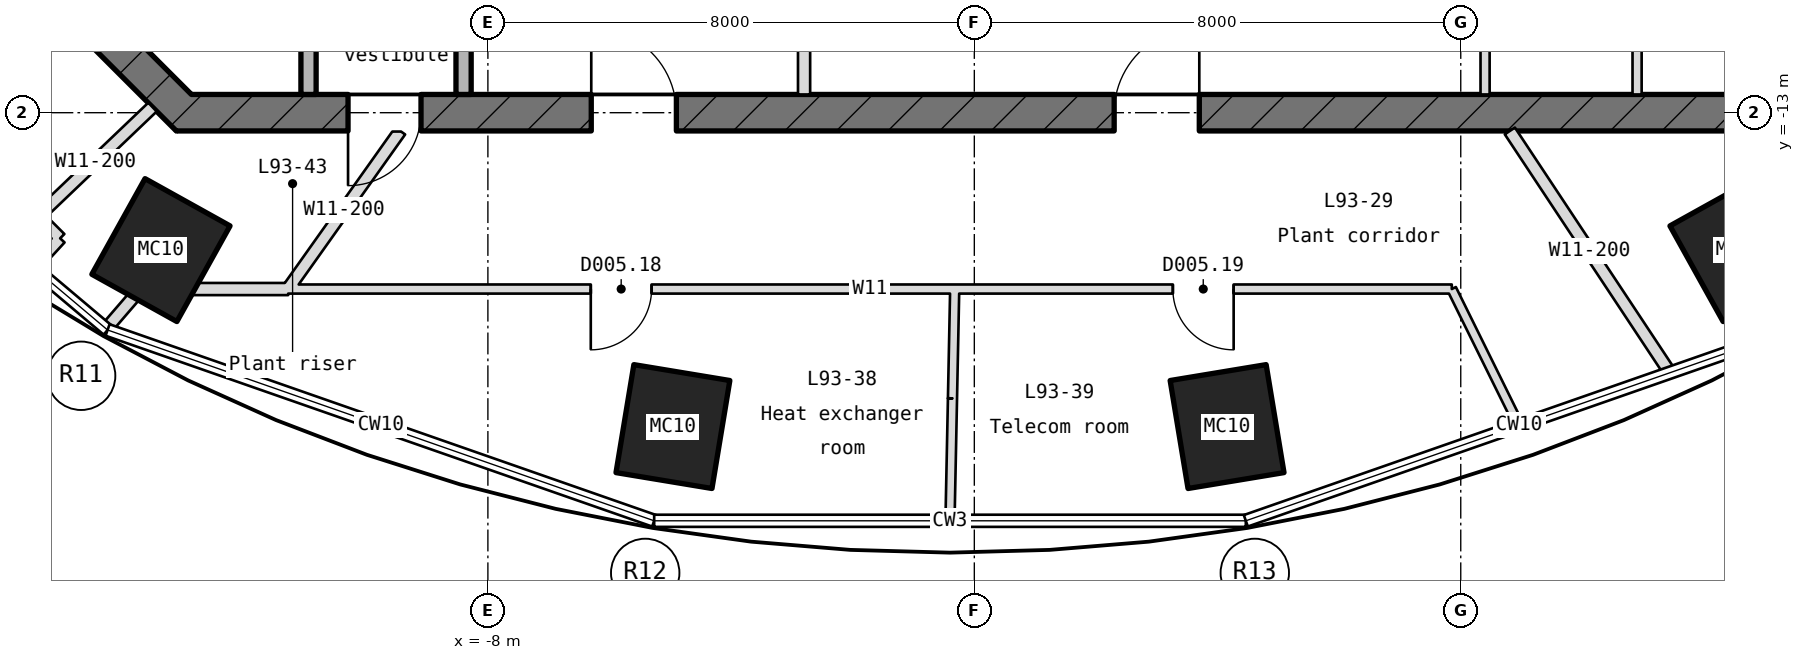
"""IFC4 building model, lengths in metres.
Left out: names, types, materials, properties, quantities, classifications, styles, units other than length and angle.
Written with IfcOpenShell. Run it as: python <this file> out.ifc"""

import sys

from ifc_helpers import new_model, si_unit, direction, frame, frame_2d, origin, origin_2d, place, context, subcontext, project, spatial, rectangle, hollow_rectangle, extrude, element, fill, save


model = new_model("IFC4")
c1 = context("Model", 3, precision=1e-05, world=origin(), true_north=direction((0.0, 1.0)))
c2 = subcontext(c1, "Body", "Model", "MODEL_VIEW")
j1 = project(units=[si_unit("LENGTHUNIT", "METRE"), si_unit("PLANEANGLEUNIT", "RADIAN")], contexts=[c1])
p1 = place(None, origin())
s1 = spatial("IfcSite", under=j1, at=p1, CompositionType="ELEMENT")
p2 = place(p1, origin())
s2 = spatial("IfcBuilding", under=s1, at=p2, CompositionType="ELEMENT")
p3 = place(p2, frame((0.0, 0.0, 413.55)))
s3 = spatial("IfcBuildingStorey", under=s2, at=p3, CompositionType="ELEMENT", Elevation=413.55)
for number, where, z_axis, x_axis in (
    (1, (-13.377, -15.26, -0.2), (0.0, 0.0, 1.0), (-0.874, 0.486, 0.0)),
    (2, (-4.957, -18.162, -0.2), (0.0, 0.0, 1.0), (-0.987, 0.163, 0.0)),
    (3, (4.157, -18.162, -0.2), (0.0, 0.0, 1.0), (-0.987, -0.163, 0.0)),
    (4, (12.577, -15.26, -0.2), (0.0, 0.0, 1.0), (-0.874, -0.486, 0.0)),
):
    element("IfcColumn", number, at=place(p3, frame(where, z_axis=z_axis, x_axis=x_axis)), inside=s3, PredefinedType="COLUMN", context=c2, shape_type="SweptSolid", body=[
        extrude(hollow_rectangle(XDim=1.6, YDim=1.8, WallThickness=0.045, at=origin_2d()), origin(), (0.0, 0.0, 1.0), 5.0),
    ])
p4 = place(p3, frame((-16.088, -9.912, -0.2), z_axis=(0.0, 0.0, 1.0), x_axis=(0.707106781187, -0.707106781187, 0.0)))
e5 = element("IfcWall", 5, at=p4, inside=s3, PredefinedType="SHEAR", context=c2, shape_type="SweptSolid", body=[
    extrude(rectangle(XDim=4.491, YDim=0.6, at=frame_2d((2.246, 0.0))), origin(), (0.0, 0.0, 1.0), 5.0),
])
p5 = place(p3, frame((-13.124, -13.0, -0.2), z_axis=(0.0, 0.0, 1.0), x_axis=(1.0, 0.0, 0.0)))
e6 = element("IfcWall", 6, at=p5, inside=s3, PredefinedType="SHEAR", context=c2, shape_type="SweptSolid", body=[
    extrude(rectangle(XDim=26.249, YDim=0.6, at=frame_2d((13.124, 0.0))), origin(), (0.0, 0.0, 1.0), 5.0),
])
p6 = place(p5, frame((2.824, 0.0, 0.2)))
e7 = element("IfcOpeningElement", 7, at=p6, cuts=e6, PredefinedType="OPENING", context=c2, shape_type="SweptSolid", body=[
    extrude(rectangle(XDim=1.2, YDim=2.1, at=frame_2d((0.6, 1.05))), frame((0.0, 0.31, 0.0), z_axis=(0.0, -1.0, 0.0), x_axis=(1.0, 0.0, 0.0)), (0.0, 0.0, 1.0), 0.62),
])
p7 = place(p5, frame((6.824, 0.0, 0.2)))
e8 = element("IfcOpeningElement", 8, at=p7, cuts=e6, PredefinedType="OPENING", context=c2, shape_type="SweptSolid", body=[
    extrude(rectangle(XDim=1.4, YDim=2.1, at=frame_2d((0.7, 1.05))), frame((0.0, 0.31, 0.0), z_axis=(0.0, -1.0, 0.0), x_axis=(1.0, 0.0, 0.0)), (0.0, 0.0, 1.0), 0.62),
])
p8 = place(p5, frame((15.424, 0.0, 0.2)))
e9 = element("IfcOpeningElement", 9, at=p8, cuts=e6, PredefinedType="OPENING", context=c2, shape_type="SweptSolid", body=[
    extrude(rectangle(XDim=1.4, YDim=2.1, at=frame_2d((0.7, 1.05))), frame((0.0, 0.31, 0.0), z_axis=(0.0, -1.0, 0.0), x_axis=(1.0, 0.0, 0.0)), (0.0, 0.0, 1.0), 0.62),
])
p9 = place(p3, frame((-10.95, -12.7, 0.0), z_axis=(0.0, 0.0, 1.0), x_axis=(0.0, 1.0, 0.0)))
e10 = element("IfcWall", 10, at=p9, inside=s3, PredefinedType="STANDARD", context=c2, shape_type="SweptSolid", body=[
    extrude(rectangle(XDim=3.825, YDim=0.25, at=frame_2d((1.913, 0.0))), origin(), (0.0, 0.0, 1.0), 4.8),
])
p10 = place(p3, frame((-8.4, -12.7, 0.0), z_axis=(0.0, 0.0, 1.0), x_axis=(0.0, 1.0, 0.0)))
e11 = element("IfcWall", 11, at=p10, inside=s3, PredefinedType="STANDARD", context=c2, shape_type="SweptSolid", body=[
    extrude(rectangle(XDim=3.95, YDim=0.25, at=frame_2d((1.975, 0.0))), origin(), (0.0, 0.0, 1.0), 4.8),
])
p11 = place(p10, frame((1.6, 0.0, 0.0)))
e12 = element("IfcOpeningElement", 12, at=p11, cuts=e11, PredefinedType="OPENING", context=c2, shape_type="SweptSolid", body=[
    extrude(rectangle(XDim=1.1, YDim=2.1, at=frame_2d((0.55, 1.05))), frame((0.0, 0.135, 0.0), z_axis=(0.0, -1.0, 0.0), x_axis=(1.0, 0.0, 0.0)), (0.0, 0.0, 1.0), 0.27),
])
p12 = place(p3, frame((-2.8, -12.7, 0.0), z_axis=(0.0, 0.0, 1.0), x_axis=(0.0, 1.0, 0.0)))
e13 = element("IfcWall", 13, at=p12, inside=s3, PredefinedType="PARTITIONING", context=c2, shape_type="SweptSolid", body=[
    extrude(rectangle(XDim=4.24, YDim=0.2, at=frame_2d((2.12, 0.0))), origin(), (0.0, 0.0, 1.0), 4.8),
])
p13 = place(p3, frame((8.4, -12.7, 0.0), z_axis=(0.0, 0.0, 1.0), x_axis=(0.0, 1.0, 0.0)))
e14 = element("IfcWall", 14, at=p13, inside=s3, PredefinedType="PARTITIONING", context=c2, shape_type="SweptSolid", body=[
    extrude(rectangle(XDim=4.35, YDim=0.15, at=frame_2d((2.175, 0.0))), origin(), (0.0, 0.0, 1.0), 4.8),
])
p14 = place(p13, frame((1.575, 0.0, 0.0)))
e15 = element("IfcOpeningElement", 15, at=p14, cuts=e14, PredefinedType="OPENING", context=c2, shape_type="SweptSolid", body=[
    extrude(rectangle(XDim=1.2, YDim=2.1, at=frame_2d((0.6, 1.05))), frame((0.0, 0.085, 0.0), z_axis=(0.0, -1.0, 0.0), x_axis=(1.0, 0.0, 0.0)), (0.0, 0.0, 1.0), 0.17),
])
p15 = place(p3, frame((10.9, -12.7, 0.0), z_axis=(0.0, 0.0, 1.0), x_axis=(0.0, 1.0, 0.0)))
e16 = element("IfcWall", 16, at=p15, inside=s3, PredefinedType="PARTITIONING", context=c2, shape_type="SweptSolid", body=[
    extrude(rectangle(XDim=10.275, YDim=0.15, at=frame_2d((5.137, 0.0))), origin(), (0.0, 0.0, 1.0), 4.8),
])
p16 = place(p15, frame((7.925, 0.0, 0.0)))
e17 = element("IfcOpeningElement", 17, at=p16, cuts=e16, PredefinedType="OPENING", context=c2, shape_type="SweptSolid", body=[
    extrude(rectangle(XDim=1.0, YDim=2.1, at=frame_2d((0.5, 1.05))), frame((0.0, 0.085, 0.0), z_axis=(0.0, -1.0, 0.0), x_axis=(1.0, 0.0, 0.0)), (0.0, 0.0, 1.0), 0.17),
])
p17 = place(p15, frame((2.75, 0.0, 0.0)))
e18 = element("IfcOpeningElement", 18, at=p17, cuts=e16, PredefinedType="OPENING", context=c2, shape_type="SweptSolid", body=[
    extrude(rectangle(XDim=1.0, YDim=2.1, at=frame_2d((0.5, 1.05))), frame((0.0, 0.085, 0.0), z_axis=(0.0, -1.0, 0.0), x_axis=(1.0, 0.0, 0.0)), (0.0, 0.0, 1.0), 0.17),
])
p18 = place(p3, frame((-11.288, -15.9, 0.0), z_axis=(0.0, 0.0, 1.0), x_axis=(1.0, 0.0, 0.0)))
e19 = element("IfcWall", 19, at=p18, inside=s3, PredefinedType="PARTITIONING", context=c2, shape_type="SweptSolid", body=[
    extrude(rectangle(XDim=19.141, YDim=0.15, at=frame_2d((9.57, 0.0))), origin(), (0.0, 0.0, 1.0), 4.8),
])
p19 = place(p18, frame((4.98, 0.0, 0.0)))
e20 = element("IfcOpeningElement", 20, at=p19, cuts=e19, PredefinedType="OPENING", context=c2, shape_type="SweptSolid", body=[
    extrude(rectangle(XDim=1.0, YDim=2.1, at=frame_2d((0.5, 1.05))), frame((0.0, 0.085, 0.0), z_axis=(0.0, -1.0, 0.0), x_axis=(1.0, 0.0, 0.0)), (0.0, 0.0, 1.0), 0.17),
])
p20 = place(p18, frame((14.553, 0.0, 0.0)))
e21 = element("IfcOpeningElement", 21, at=p20, cuts=e19, PredefinedType="OPENING", context=c2, shape_type="SweptSolid", body=[
    extrude(rectangle(XDim=1.0, YDim=2.1, at=frame_2d((0.5, 1.05))), frame((0.0, 0.085, 0.0), z_axis=(0.0, -1.0, 0.0), x_axis=(1.0, 0.0, 0.0)), (0.0, 0.0, 1.0), 0.17),
])
p21 = place(p3, frame((-0.4, -19.691, 0.0), z_axis=(0.0, 0.0, 1.0), x_axis=(0.020323991195, 0.999793446359, 0.0)))
e22 = element("IfcWall", 22, at=p21, inside=s3, PredefinedType="PARTITIONING", context=c2, shape_type="SweptSolid", body=[
    extrude(rectangle(XDim=1.994, YDim=0.15, at=frame_2d((0.997, 0.0))), origin(), (0.0, 0.0, 1.0), 4.8),
])
p22 = place(p3, frame((-0.359, -17.698, 0.0), z_axis=(0.0, 0.0, 1.0), x_axis=(0.020232174519, 0.999795308608, 0.0)))
e23 = element("IfcWall", 23, at=p22, inside=s3, PredefinedType="PARTITIONING", context=c2, shape_type="SweptSolid", body=[
    extrude(rectangle(XDim=1.798, YDim=0.15, at=frame_2d((0.899, 0.0))), origin(), (0.0, 0.0, 1.0), 4.49),
])
p23 = place(p3, frame((8.951, -18.124, 0.0), z_axis=(0.0, 0.0, 1.0), x_axis=(-0.44283891536, 0.896601190632, 0.0)))
e24 = element("IfcWall", 24, at=p23, inside=s3, PredefinedType="PARTITIONING", context=c2, shape_type="SweptSolid", body=[
    extrude(rectangle(XDim=2.481, YDim=0.15, at=frame_2d((1.24, 0.0))), origin(), (0.0, 0.0, 1.0), 4.8),
])
p24 = place(p3, frame((-13.714, -15.9, 0.0), z_axis=(0.0, 0.0, 1.0), x_axis=(1.0, 0.0, 0.0)))
e25 = element("IfcWall", 25, at=p24, inside=s3, PredefinedType="PARTITIONING", context=c2, shape_type="SweptSolid", body=[
    extrude(rectangle(XDim=2.429, YDim=0.2, at=frame_2d((1.215, 0.0))), origin(), (0.0, 0.0, 1.0), 4.8),
])
p25 = place(p3, frame((-15.397, -14.704, 0.0), z_axis=(0.0, 0.0, 1.0), x_axis=(0.723206343498, 0.690632018317, 0.0)))
e26 = element("IfcWall", 26, at=p25, inside=s3, PredefinedType="PARTITIONING", context=c2, shape_type="SweptSolid", body=[
    extrude(rectangle(XDim=2.601, YDim=0.2, at=frame_2d((1.3, 0.0))), origin(), (0.0, 0.0, 1.0), 4.8),
])
p26 = place(p3, frame((-15.462, -15.53, 0.0), z_axis=(0.0, 0.0, 1.0), x_axis=(0.676443601068, 0.736494436214, 0.0)))
e27 = element("IfcWall", 27, at=p26, inside=s3, PredefinedType="PARTITIONING", context=c2, shape_type="SweptSolid", body=[
    extrude(rectangle(XDim=0.63, YDim=0.2, at=frame_2d((0.315, 0.0))), origin(), (0.0, 0.0, 1.0), 4.8),
])
p27 = place(p3, frame((-14.265, -16.539, 0.0), z_axis=(0.0, 0.0, 1.0), x_axis=(0.653099884045, 0.757271775164, 0.0)))
e28 = element("IfcWall", 28, at=p27, inside=s3, PredefinedType="PARTITIONING", context=c2, shape_type="SweptSolid", body=[
    extrude(rectangle(XDim=0.844, YDim=0.2, at=frame_2d((0.422, 0.0))), origin(), (0.0, 0.0, 1.0), 4.8),
])
p28 = place(p3, frame((-11.288, -15.9, 0.0), z_axis=(0.0, 0.0, 1.0), x_axis=(0.578932609367, 0.815375394412, 0.0)))
e29 = element("IfcWall", 29, at=p28, inside=s3, PredefinedType="PARTITIONING", context=c2, shape_type="SweptSolid", body=[
    extrude(rectangle(XDim=3.188, YDim=0.2, at=frame_2d((1.594, 0.0))), origin(), (0.0, 0.0, 1.0), 4.8),
])
p29 = place(p3, frame((11.429, -17.259, 0.0), z_axis=(0.0, 0.0, 1.0), x_axis=(-0.55212294176, 0.833762710357, 0.0)))
e30 = element("IfcWall", 30, at=p29, inside=s3, PredefinedType="PARTITIONING", context=c2, shape_type="SweptSolid", body=[
    extrude(rectangle(XDim=4.749, YDim=0.2, at=frame_2d((2.374, 0.0))), origin(), (0.0, 0.0, 1.0), 4.8),
])
p30 = place(p3, frame((-15.035, -15.066, 0.0), z_axis=(0.0, 0.0, 1.0), x_axis=(-0.707106781187, 0.707106781187, 0.0)))
e31 = element("IfcWall", 31, at=p30, inside=s3, PredefinedType="PARTITIONING", context=c2, shape_type="SweptSolid", body=[
    extrude(rectangle(XDim=0.515, YDim=0.2, at=frame_2d((0.257, 0.0))), origin(), (0.0, 0.0, 1.0), 4.8),
])
p31 = place(p6, frame((1.2, 0.0, 0.0), z_axis=(0.0, 0.0, 1.0), x_axis=(-1.0, 0.0, 0.0)))
e32 = element("IfcDoor", 32, at=p31, inside=s3, OperationType="SINGLE_SWING_LEFT", PredefinedType="DOOR", context=c2, shape_type="SweptSolid", body=[
    extrude(rectangle(XDim=1.2, YDim=2.1, at=frame_2d((0.6, 1.05))), frame((0.0, 0.025, 0.0), z_axis=(0.0, -1.0, 0.0), x_axis=(1.0, 0.0, 0.0)), (0.0, 0.0, 1.0), 0.05),
])
fill(e7, e32)
p32 = place(p7, origin())
e33 = element("IfcDoor", 33, at=p32, inside=s3, OperationType="SINGLE_SWING_RIGHT", PredefinedType="DOOR", context=c2, shape_type="SweptSolid", body=[
    extrude(rectangle(XDim=1.4, YDim=2.1, at=frame_2d((0.7, 1.05))), frame((0.0, 0.025, 0.0), z_axis=(0.0, -1.0, 0.0), x_axis=(1.0, 0.0, 0.0)), (0.0, 0.0, 1.0), 0.05),
])
fill(e8, e33)
p33 = place(p8, origin())
e34 = element("IfcDoor", 34, at=p33, inside=s3, OperationType="SINGLE_SWING_RIGHT", PredefinedType="DOOR", context=c2, shape_type="SweptSolid", body=[
    extrude(rectangle(XDim=1.4, YDim=2.1, at=frame_2d((0.7, 1.05))), frame((0.0, 0.025, 0.0), z_axis=(0.0, -1.0, 0.0), x_axis=(1.0, 0.0, 0.0)), (0.0, 0.0, 1.0), 0.05),
])
fill(e9, e34)
p34 = place(p19, frame((1.0, 0.0, 0.0), z_axis=(0.0, 0.0, 1.0), x_axis=(-1.0, 0.0, 0.0)))
e35 = element("IfcDoor", 35, at=p34, inside=s3, OperationType="SINGLE_SWING_LEFT", PredefinedType="DOOR", context=c2, shape_type="SweptSolid", body=[
    extrude(rectangle(XDim=1.0, YDim=2.1, at=frame_2d((0.5, 1.05))), frame((0.0, 0.025, 0.0), z_axis=(0.0, -1.0, 0.0), x_axis=(1.0, 0.0, 0.0)), (0.0, 0.0, 1.0), 0.05),
])
fill(e20, e35)
p35 = place(p20, frame((1.0, 0.0, 0.0), z_axis=(0.0, 0.0, 1.0), x_axis=(-1.0, 0.0, 0.0)))
e36 = element("IfcDoor", 36, at=p35, inside=s3, OperationType="SINGLE_SWING_LEFT", PredefinedType="DOOR", context=c2, shape_type="SweptSolid", body=[
    extrude(rectangle(XDim=1.0, YDim=2.1, at=frame_2d((0.5, 1.05))), frame((0.0, 0.025, 0.0), z_axis=(0.0, -1.0, 0.0), x_axis=(1.0, 0.0, 0.0)), (0.0, 0.0, 1.0), 0.05),
])
fill(e21, e36)
save(model, sys.argv[1])
